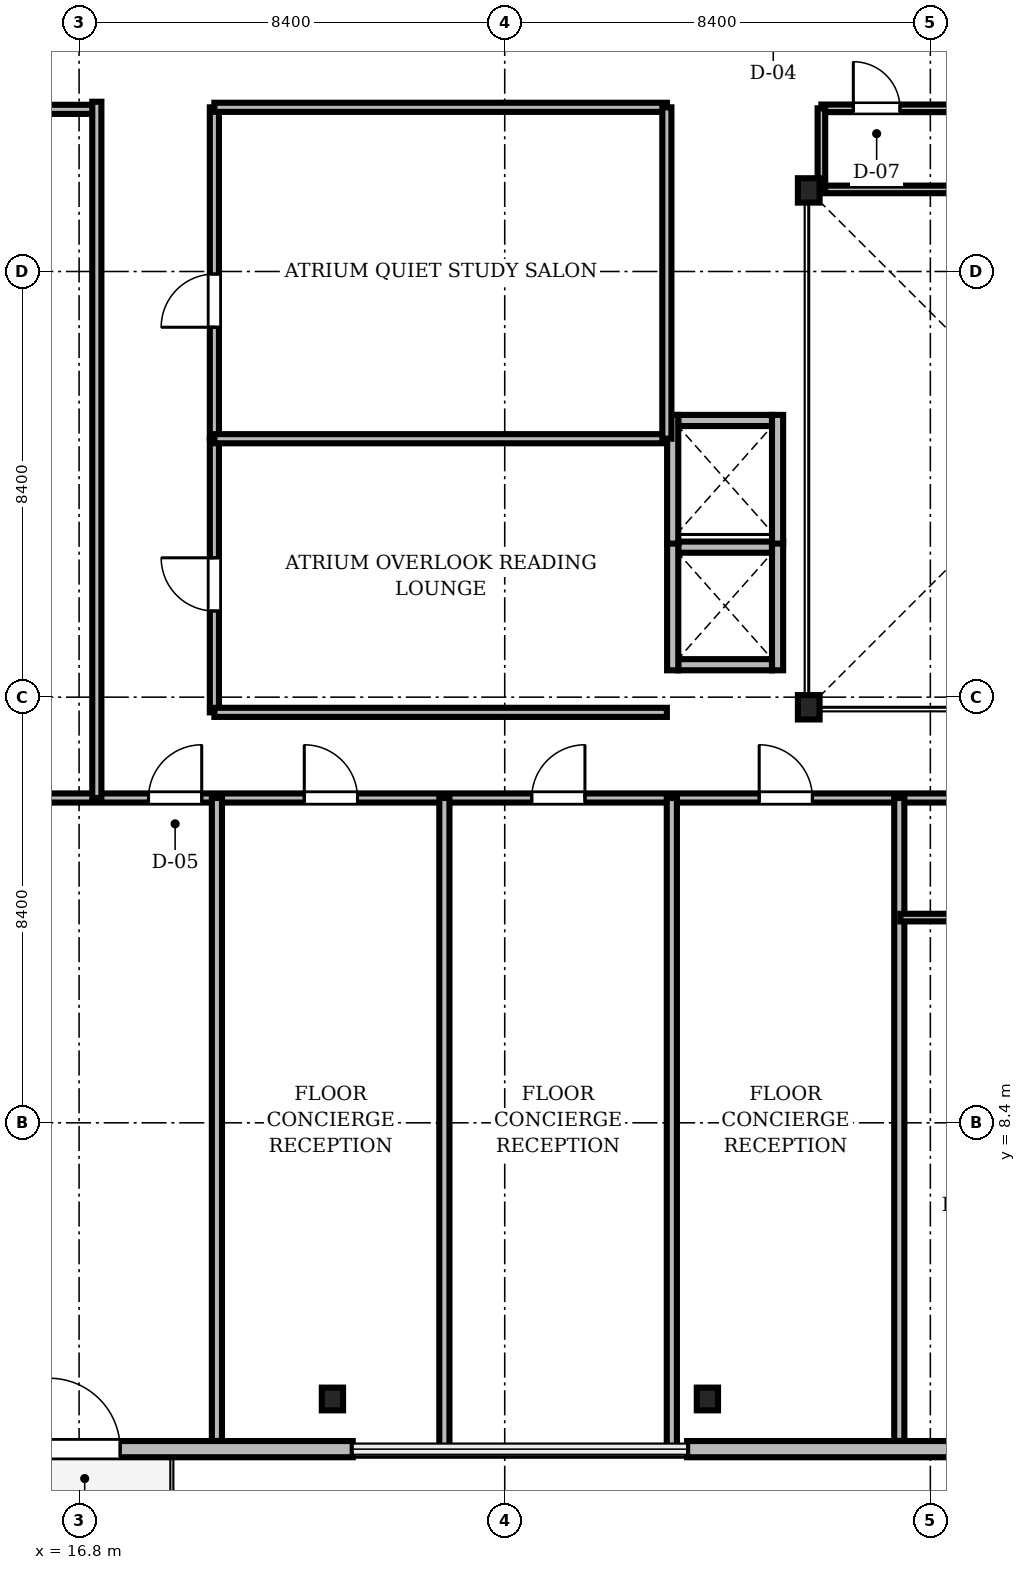
"""IFC4 building model, lengths in metres.
Left out: names, types, materials, properties, quantities, classifications, styles, units other than length and angle.
Written with IfcOpenShell. Run it as: python <this file> out.ifc"""

import sys

from ifc_helpers import new_model, si_unit, direction, frame, frame_2d, origin, origin_2d, place, context, subcontext, project, spatial, rectangle, i_section, extrude, source, transform, mapped, element, fill, save


model = new_model("IFC4")
c1 = context("Model", 3, precision=1e-05, world=origin(), true_north=direction((0.0, 1.0)))
c2 = subcontext(c1, "Body", "Model", "MODEL_VIEW")
j1 = project(units=[si_unit("LENGTHUNIT", "METRE"), si_unit("PLANEANGLEUNIT", "RADIAN")], contexts=[c1])
p1 = place(None, origin())
s1 = spatial("IfcSite", under=j1, at=p1, CompositionType="ELEMENT")
p2 = place(p1, origin())
s2 = spatial("IfcBuilding", under=s1, at=p2, CompositionType="ELEMENT")
p3 = place(p2, frame((0.0, 0.0, 86.0)))
s3 = spatial("IfcBuildingStorey", under=s2, at=p3, CompositionType="ELEMENT", Elevation=86.0)
m1 = source(origin(), c2, "Body", "SweptSolid", [
    extrude(i_section(OverallWidth=0.428, OverallDepth=0.481, WebThickness=0.04, FlangeThickness=0.063, FilletRadius=0.015, at=origin_2d()), origin(), (0.0, 0.0, 1.0), 3.41),
])
for number, where, z_axis, x_axis in (
    (1, (31.2, 16.6, 0.0), (0.0, 0.0, 1.0), (1.0, 0.0, 0.0)),
    (2, (31.2, 26.8, 0.0), (0.0, 0.0, 1.0), (1.0, 0.0, 0.0)),
):
    element("IfcColumn", number, at=place(p3, frame(where, z_axis=z_axis, x_axis=x_axis)), inside=s3, PredefinedType="COLUMN", context=c2, shape_type="MappedRepresentation", body=[
        mapped(m1, transform((0.0, 0.0, 0.0), scale=1.0)),
    ])
m2 = source(origin(), c2, "Body", "SweptSolid", [
    extrude(i_section(OverallWidth=0.419, OverallDepth=0.449, WebThickness=0.031, FlangeThickness=0.048, FilletRadius=0.015, at=origin_2d()), origin(), (0.0, 0.0, 1.0), 3.41),
])
for number, where, z_axis, x_axis in (
    (3, (21.8, 2.95, 0.0), (0.0, 0.0, 1.0), (1.0, 0.0, 0.0)),
    (4, (29.2, 2.95, 0.0), (0.0, 0.0, 1.0), (1.0, 0.0, 0.0)),
):
    element("IfcColumn", number, at=place(p3, frame(where, z_axis=z_axis, x_axis=x_axis)), inside=s3, PredefinedType="COLUMN", context=c2, shape_type="MappedRepresentation", body=[
        mapped(m2, transform((0.0, 0.0, 0.0), scale=1.0)),
    ])
m3 = source(origin(), c2, "Body", "SweptSolid", [
    extrude(rectangle(XDim=15.6, YDim=0.32, at=frame_2d((7.8, 0.0))), origin(), (0.0, 0.0, 1.0), 3.41),
])
p4 = place(p3, frame((6.6, 1.96, 0.0), z_axis=(0.0, 0.0, 1.0), x_axis=(1.0, 0.0, 0.0)))
e5 = element("IfcWall", 5, at=p4, inside=s3, PredefinedType="SOLIDWALL", context=c2, shape_type="MappedRepresentation", body=[
    mapped(m3, transform((0.0, 0.0, 0.0), scale=1.0)),
])
m4 = source(origin(), c2, "Body", "SweptSolid", [
    extrude(rectangle(XDim=1.4, YDim=2.3, at=frame_2d((0.7, 1.15))), frame((0.0, 0.17, 0.0), z_axis=(0.0, -1.0, 0.0), x_axis=(1.0, 0.0, 0.0)), (0.0, 0.0, 1.0), 0.34),
])
p5 = place(p4, frame((9.61, 0.0, 0.0)))
e6 = element("IfcOpeningElement", 6, at=p5, cuts=e5, PredefinedType="OPENING", context=c2, shape_type="MappedRepresentation", body=[
    mapped(m4, transform((0.0, 0.0, 0.0), scale=1.0)),
])
m5 = source(origin(), c2, "Body", "SweptSolid", [
    extrude(rectangle(XDim=2.8, YDim=2.4, at=frame_2d((1.4, 1.2))), frame((0.0, 0.17, 0.0), z_axis=(0.0, -1.0, 0.0), x_axis=(1.0, 0.0, 0.0)), (0.0, 0.0, 1.0), 0.34),
])
p6 = place(p4, frame((2.705, 0.0, 0.72)))
e7 = element("IfcOpeningElement", 7, at=p6, cuts=e5, PredefinedType="OPENING", context=c2, shape_type="MappedRepresentation", body=[
    mapped(m5, transform((0.0, 0.0, 0.0), scale=1.0)),
])
p7 = place(p3, frame((28.8, 1.96, 0.0), z_axis=(0.0, 0.0, 1.0), x_axis=(1.0, 0.0, 0.0)))
e8 = element("IfcWall", 8, at=p7, inside=s3, PredefinedType="SOLIDWALL", context=c2, shape_type="MappedRepresentation", body=[
    mapped(m3, transform((0.0, 0.0, 0.0), scale=1.0)),
])
p8 = place(p7, frame((9.645, 0.0, 0.72)))
e9 = element("IfcOpeningElement", 9, at=p8, cuts=e8, PredefinedType="OPENING", context=c2, shape_type="MappedRepresentation", body=[
    mapped(m5, transform((0.0, 0.0, 0.0), scale=1.0)),
])
m6 = source(origin(), c2, "Body", "SweptSolid", [
    extrude(rectangle(XDim=1.8, YDim=2.4, at=frame_2d((0.9, 1.2))), frame((0.0, 0.17, 0.0), z_axis=(0.0, -1.0, 0.0), x_axis=(1.0, 0.0, 0.0)), (0.0, 0.0, 1.0), 0.34),
])
p9 = place(p7, frame((5.531, 0.0, 0.72)))
e10 = element("IfcOpeningElement", 10, at=p9, cuts=e8, PredefinedType="OPENING", context=c2, shape_type="MappedRepresentation", body=[
    mapped(m6, transform((0.0, 0.0, 0.0), scale=1.0)),
])
m7 = source(origin(), c2, "Body", "SweptSolid", [
    extrude(rectangle(XDim=1.85, YDim=0.22, at=frame_2d((0.925, 0.0))), origin(), (0.0, 0.0, 1.0), 3.41),
])
for number, where, z_axis, x_axis in (
    (11, (28.625, 17.44, 0.0), (0.0, 0.0, 1.0), (1.0, 0.0, 0.0)),
    (12, (28.625, 19.76, 0.0), (0.0, 0.0, 1.0), (1.0, 0.0, 0.0)),
):
    element("IfcWall", number, at=place(p3, frame(where, z_axis=z_axis, x_axis=x_axis)), inside=s3, PredefinedType="SOLIDWALL", context=c2, shape_type="MappedRepresentation", body=[
        mapped(m7, transform((0.0, 0.0, 0.0), scale=1.0)),
    ])
m8 = source(origin(), c2, "Body", "SweptSolid", [
    extrude(rectangle(XDim=2.54, YDim=0.22, at=frame_2d((1.27, 0.0))), origin(), (0.0, 0.0, 1.0), 3.41),
])
for number, where, z_axis, x_axis in (
    (13, (28.515, 17.33, 0.0), (0.0, 0.0, 1.0), (0.0, 1.0, 0.0)),
    (14, (30.585, 17.33, 0.0), (0.0, 0.0, 1.0), (0.0, 1.0, 0.0)),
):
    element("IfcWall", number, at=place(p3, frame(where, z_axis=z_axis, x_axis=x_axis)), inside=s3, PredefinedType="SOLIDWALL", context=c2, shape_type="MappedRepresentation", body=[
        mapped(m8, transform((0.0, 0.0, 0.0), scale=1.0)),
    ])
p10 = place(p3, frame((28.625, 22.26, 0.0), z_axis=(0.0, 0.0, 1.0), x_axis=(1.0, 0.0, 0.0)))
e15 = element("IfcWall", 15, at=p10, inside=s3, PredefinedType="SOLIDWALL", context=c2, shape_type="MappedRepresentation", body=[
    mapped(m7, transform((0.0, 0.0, 0.0), scale=1.0)),
])
for number, where, z_axis, x_axis in (
    (16, (28.515, 19.83, 0.0), (0.0, 0.0, 1.0), (0.0, 1.0, 0.0)),
    (17, (30.585, 19.83, 0.0), (0.0, 0.0, 1.0), (0.0, 1.0, 0.0)),
):
    element("IfcWall", number, at=place(p3, frame(where, z_axis=z_axis, x_axis=x_axis)), inside=s3, PredefinedType="SOLIDWALL", context=c2, shape_type="MappedRepresentation", body=[
        mapped(m8, transform((0.0, 0.0, 0.0), scale=1.0)),
    ])
m9 = source(origin(), c2, "Body", "SweptSolid", [
    extrude(rectangle(XDim=46.156, YDim=0.18, at=frame_2d((23.078, 0.0))), origin(), (0.0, 0.0, 1.0), 2.652),
])
p11 = place(p3, frame((2.422, 14.81, 0.0), z_axis=(0.0, 0.0, 1.0), x_axis=(1.0, 0.0, 0.0)))
e18 = element("IfcWall", 18, at=p11, inside=s3, PredefinedType="PARTITIONING", context=c2, shape_type="MappedRepresentation", body=[
    mapped(m9, transform((0.0, 0.0, 0.0), scale=1.0)),
])
m10 = source(origin(), c2, "Body", "SweptSolid", [
    extrude(rectangle(XDim=1.05, YDim=2.2, at=frame_2d((0.525, 1.1))), frame((0.0, 0.1, 0.0), z_axis=(0.0, -1.0, 0.0), x_axis=(1.0, 0.0, 0.0)), (0.0, 0.0, 1.0), 0.2),
])
p12 = place(p11, frame((15.748, 0.0, 0.0)))
e19 = element("IfcOpeningElement", 19, at=p12, cuts=e18, PredefinedType="OPENING", context=c2, shape_type="MappedRepresentation", body=[
    mapped(m10, transform((0.0, 0.0, 0.0), scale=1.0)),
])
p13 = place(p11, frame((18.823, 0.0, 0.0)))
e20 = element("IfcOpeningElement", 20, at=p13, cuts=e18, PredefinedType="OPENING", context=c2, shape_type="MappedRepresentation", body=[
    mapped(m10, transform((0.0, 0.0, 0.0), scale=1.0)),
])
p14 = place(p11, frame((23.311, 0.0, 0.0)))
e21 = element("IfcOpeningElement", 21, at=p14, cuts=e18, PredefinedType="OPENING", context=c2, shape_type="MappedRepresentation", body=[
    mapped(m10, transform((0.0, 0.0, 0.0), scale=1.0)),
])
p15 = place(p11, frame((27.8, 0.0, 0.0)))
e22 = element("IfcOpeningElement", 22, at=p15, cuts=e18, PredefinedType="OPENING", context=c2, shape_type="MappedRepresentation", body=[
    mapped(m10, transform((0.0, 0.0, 0.0), scale=1.0)),
])
m11 = source(origin(), c2, "Body", "SweptSolid", [
    extrude(rectangle(XDim=0.95, YDim=2.15, at=frame_2d((0.475, 1.075))), frame((0.0, 0.1, 0.0), z_axis=(0.0, -1.0, 0.0), x_axis=(1.0, 0.0, 0.0)), (0.0, 0.0, 1.0), 0.2),
])
p16 = place(p11, frame((33.514, 0.0, 0.0)))
e23 = element("IfcOpeningElement", 23, at=p16, cuts=e18, PredefinedType="OPENING", context=c2, shape_type="MappedRepresentation", body=[
    mapped(m11, transform((0.0, 0.0, 0.0), scale=1.0)),
])
p17 = place(p11, frame((36.778, 0.0, 0.0)))
e24 = element("IfcOpeningElement", 24, at=p17, cuts=e18, PredefinedType="OPENING", context=c2, shape_type="MappedRepresentation", body=[
    mapped(m10, transform((0.0, 0.0, 0.0), scale=1.0)),
])
p18 = place(p11, frame((42.315, 0.0, 0.0)))
e25 = element("IfcOpeningElement", 25, at=p18, cuts=e18, PredefinedType="OPENING", context=c2, shape_type="MappedRepresentation", body=[
    mapped(m10, transform((0.0, 0.0, 0.0), scale=1.0)),
])
m12 = source(origin(), c2, "Body", "SweptSolid", [
    extrude(rectangle(XDim=6.54, YDim=0.18, at=frame_2d((3.27, 0.0))), origin(), (0.0, 0.0, 1.0), 2.802),
])
p19 = place(p3, frame((19.47, 21.9, 0.0), z_axis=(0.0, 0.0, 1.0), x_axis=(0.0, 1.0, 0.0)))
e26 = element("IfcWall", 26, at=p19, inside=s3, PredefinedType="PARTITIONING", context=c2, shape_type="MappedRepresentation", body=[
    mapped(m12, transform((0.0, 0.0, 0.0), scale=1.0)),
])
p20 = place(p19, frame((2.2, 0.0, 0.0)))
e27 = element("IfcOpeningElement", 27, at=p20, cuts=e26, PredefinedType="OPENING", context=c2, shape_type="MappedRepresentation", body=[
    mapped(m10, transform((0.0, 0.0, 0.0), scale=1.0)),
])
m13 = source(origin(), c2, "Body", "SweptSolid", [
    extrude(rectangle(XDim=5.4, YDim=0.18, at=frame_2d((2.7, 0.0))), origin(), (0.0, 0.0, 1.0), 2.802),
])
p21 = place(p3, frame((19.47, 16.5, 0.0), z_axis=(0.0, 0.0, 1.0), x_axis=(0.0, 1.0, 0.0)))
e28 = element("IfcWall", 28, at=p21, inside=s3, PredefinedType="PARTITIONING", context=c2, shape_type="MappedRepresentation", body=[
    mapped(m13, transform((0.0, 0.0, 0.0), scale=1.0)),
])
p22 = place(p21, frame((2.0, 0.0, 0.0)))
e29 = element("IfcOpeningElement", 29, at=p22, cuts=e28, PredefinedType="OPENING", context=c2, shape_type="MappedRepresentation", body=[
    mapped(m10, transform((0.0, 0.0, 0.0), scale=1.0)),
])
m14 = source(origin(), c2, "Body", "SweptSolid", [
    extrude(rectangle(XDim=2.67, YDim=0.15, at=frame_2d((1.335, 0.0))), origin(), (0.0, 0.0, 1.0), 3.042),
])
p23 = place(p3, frame((31.45, 28.42, 0.0), z_axis=(0.0, 0.0, 1.0), x_axis=(1.0, 0.0, 0.0)))
e30 = element("IfcWall", 30, at=p23, inside=s3, PredefinedType="PARTITIONING", context=c2, shape_type="MappedRepresentation", body=[
    mapped(m14, transform((0.0, 0.0, 0.0), scale=1.0)),
])
m15 = source(origin(), c2, "Body", "SweptSolid", [
    extrude(rectangle(XDim=0.92, YDim=2.1, at=frame_2d((0.46, 1.05))), frame((0.0, 0.085, 0.0), z_axis=(0.0, -1.0, 0.0), x_axis=(1.0, 0.0, 0.0)), (0.0, 0.0, 1.0), 0.17),
])
p24 = place(p23, frame((0.63, 0.0, 0.0)))
e31 = element("IfcOpeningElement", 31, at=p24, cuts=e30, PredefinedType="OPENING", context=c2, shape_type="MappedRepresentation", body=[
    mapped(m15, transform((0.0, 0.0, 0.0), scale=1.0)),
])
m16 = source(origin(), c2, "Body", "SweptSolid", [
    extrude(rectangle(XDim=14.92, YDim=0.18, at=frame_2d((7.46, 0.0))), origin(), (0.0, 0.0, 1.0), 2.652),
])
p25 = place(p3, frame((2.23, 28.4, 0.0), z_axis=(0.0, 0.0, 1.0), x_axis=(1.0, 0.0, 0.0)))
e32 = element("IfcWall", 32, at=p25, inside=s3, PredefinedType="PARTITIONING", context=c2, shape_type="MappedRepresentation", body=[
    mapped(m16, transform((0.0, 0.0, 0.0), scale=1.0)),
])
m17 = source(origin(), c2, "Body", "SweptSolid", [
    extrude(rectangle(XDim=13.74, YDim=0.18, at=frame_2d((6.87, 0.0))), origin(), (0.0, 0.0, 1.0), 2.802),
])
p26 = place(p3, frame((17.15, 14.81, 0.0), z_axis=(0.0, 0.0, 1.0), x_axis=(0.0, 1.0, 0.0)))
e33 = element("IfcWall", 33, at=p26, inside=s3, PredefinedType="PARTITIONING", context=c2, shape_type="MappedRepresentation", body=[
    mapped(m17, transform((0.0, 0.0, 0.0), scale=1.0)),
])
m18 = source(origin(), c2, "Body", "SweptSolid", [
    extrude(rectangle(XDim=12.688, YDim=0.2, at=frame_2d((6.344, 0.0))), origin(), (0.0, 0.0, 1.0), 2.652),
])
p27 = place(p3, frame((19.52, 2.122, 0.0), z_axis=(0.0, 0.0, 1.0), x_axis=(0.0, 1.0, 0.0)))
e34 = element("IfcWall", 34, at=p27, inside=s3, PredefinedType="PARTITIONING", context=c2, shape_type="MappedRepresentation", body=[
    mapped(m18, transform((0.0, 0.0, 0.0), scale=1.0)),
])
m19 = source(origin(), c2, "Body", "SweptSolid", [
    extrude(rectangle(XDim=12.88, YDim=0.2, at=frame_2d((6.44, 0.0))), origin(), (0.0, 0.0, 1.0), 2.652),
])
for number, where, z_axis, x_axis in (
    (35, (24.009, 1.93, 0.0), (0.0, 0.0, 1.0), (0.0, 1.0, 0.0)),
    (36, (28.498, 1.93, 0.0), (0.0, 0.0, 1.0), (0.0, 1.0, 0.0)),
):
    element("IfcWall", number, at=place(p3, frame(where, z_axis=z_axis, x_axis=x_axis)), inside=s3, PredefinedType="PARTITIONING", context=c2, shape_type="MappedRepresentation", body=[
        mapped(m19, transform((0.0, 0.0, 0.0), scale=1.0)),
    ])
p28 = place(p3, frame((32.987, 2.122, 0.0), z_axis=(0.0, 0.0, 1.0), x_axis=(0.0, 1.0, 0.0)))
e37 = element("IfcWall", 37, at=p28, inside=s3, PredefinedType="PARTITIONING", context=c2, shape_type="MappedRepresentation", body=[
    mapped(m18, transform((0.0, 0.0, 0.0), scale=1.0)),
])
m20 = source(origin(), c2, "Body", "SweptSolid", [
    extrude(rectangle(XDim=8.93, YDim=0.18, at=frame_2d((4.465, 0.0))), origin(), (0.0, 0.0, 1.0), 2.802),
])
p29 = place(p3, frame((19.47, 16.5, 0.0), z_axis=(0.0, 0.0, 1.0), x_axis=(1.0, 0.0, 0.0)))
e38 = element("IfcWall", 38, at=p29, inside=s3, PredefinedType="PARTITIONING", context=c2, shape_type="MappedRepresentation", body=[
    mapped(m20, transform((0.0, 0.0, 0.0), scale=1.0)),
])
m21 = source(origin(), c2, "Body", "SweptSolid", [
    extrude(rectangle(XDim=8.93, YDim=0.18, at=frame_2d((4.465, 0.0))), origin(), (0.0, 0.0, 1.0), 3.41),
])
for number, where, z_axis, x_axis in (
    (39, (19.47, 21.9, 0.0), (0.0, 0.0, 1.0), (1.0, 0.0, 0.0)),
    (40, (19.47, 28.44, 0.0), (0.0, 0.0, 1.0), (1.0, 0.0, 0.0)),
):
    element("IfcWall", number, at=place(p3, frame(where, z_axis=z_axis, x_axis=x_axis)), inside=s3, PredefinedType="PARTITIONING", context=c2, shape_type="MappedRepresentation", body=[
        mapped(m21, transform((0.0, 0.0, 0.0), scale=1.0)),
    ])
p30 = place(p3, frame((28.4, 21.9, 0.0), z_axis=(0.0, 0.0, 1.0), x_axis=(0.0, 1.0, 0.0)))
e41 = element("IfcWall", 41, at=p30, inside=s3, PredefinedType="PARTITIONING", context=c2, shape_type="MappedRepresentation", body=[
    mapped(m12, transform((0.0, 0.0, 0.0), scale=1.0)),
])
m22 = source(origin(), c2, "Body", "SweptSolid", [
    extrude(rectangle(XDim=2.67, YDim=0.15, at=frame_2d((1.335, 0.0))), origin(), (0.0, 0.0, 1.0), 2.952),
])
p31 = place(p3, frame((31.45, 26.82, 0.0), z_axis=(0.0, 0.0, 1.0), x_axis=(1.0, 0.0, 0.0)))
e42 = element("IfcWall", 42, at=p31, inside=s3, PredefinedType="PARTITIONING", context=c2, shape_type="MappedRepresentation", body=[
    mapped(m22, transform((0.0, 0.0, 0.0), scale=1.0)),
])
m23 = source(origin(), c2, "Body", "SweptSolid", [
    extrude(rectangle(XDim=2.29, YDim=0.15, at=frame_2d((1.145, 0.0))), origin(), (0.0, 0.0, 1.0), 2.802),
])
p32 = place(p3, frame((33.007, 12.45, 0.0), z_axis=(0.0, 0.0, 1.0), x_axis=(1.0, 0.0, 0.0)))
e43 = element("IfcWall", 43, at=p32, inside=s3, PredefinedType="PARTITIONING", context=c2, shape_type="MappedRepresentation", body=[
    mapped(m23, transform((0.0, 0.0, 0.0), scale=1.0)),
])
m24 = source(origin(), c2, "Body", "SweptSolid", [
    extrude(rectangle(XDim=1.6, YDim=0.15, at=frame_2d((0.8, 0.0))), origin(), (0.0, 0.0, 1.0), 2.952),
])
p33 = place(p3, frame((31.45, 26.82, 0.0), z_axis=(0.0, 0.0, 1.0), x_axis=(0.0, 1.0, 0.0)))
e44 = element("IfcWall", 44, at=p33, inside=s3, PredefinedType="PARTITIONING", context=c2, shape_type="MappedRepresentation", body=[
    mapped(m24, transform((0.0, 0.0, 0.0), scale=1.0)),
])
m25 = source(origin(), c2, "Body", "SweptSolid", [
    extrude(rectangle(XDim=1.4, YDim=2.3, at=frame_2d((0.7, 1.15))), frame((0.0, 0.025, 0.0), z_axis=(0.0, -1.0, 0.0), x_axis=(1.0, 0.0, 0.0)), (0.0, 0.0, 1.0), 0.05),
])
p34 = place(p5, frame((1.4, 0.0, 0.0), z_axis=(0.0, 0.0, 1.0), x_axis=(-1.0, 0.0, 0.0)))
e45 = element("IfcDoor", 45, at=p34, inside=s3, OperationType="DOUBLE_DOOR_SLIDING", PredefinedType="DOOR", context=c2, shape_type="MappedRepresentation", body=[
    mapped(m25, transform((0.0, 0.0, 0.0), scale=1.0)),
])
fill(e6, e45)
m26 = source(origin(), c2, "Body", "SweptSolid", [
    extrude(rectangle(XDim=1.05, YDim=2.2, at=frame_2d((0.525, 1.1))), frame((0.0, 0.025, 0.0), z_axis=(0.0, -1.0, 0.0), x_axis=(1.0, 0.0, 0.0)), (0.0, 0.0, 1.0), 0.05),
])
p35 = place(p12, origin())
e46 = element("IfcDoor", 46, at=p35, inside=s3, OperationType="SINGLE_SWING_RIGHT", PredefinedType="DOOR", context=c2, shape_type="MappedRepresentation", body=[
    mapped(m26, transform((0.0, 0.0, 0.0), scale=1.0)),
])
fill(e19, e46)
p36 = place(p13, origin())
e47 = element("IfcDoor", 47, at=p36, inside=s3, OperationType="SINGLE_SWING_LEFT", PredefinedType="DOOR", context=c2, shape_type="MappedRepresentation", body=[
    mapped(m26, transform((0.0, 0.0, 0.0), scale=1.0)),
])
fill(e20, e47)
p37 = place(p14, origin())
e48 = element("IfcDoor", 48, at=p37, inside=s3, OperationType="SINGLE_SWING_RIGHT", PredefinedType="DOOR", context=c2, shape_type="MappedRepresentation", body=[
    mapped(m26, transform((0.0, 0.0, 0.0), scale=1.0)),
])
fill(e21, e48)
p38 = place(p15, origin())
e49 = element("IfcDoor", 49, at=p38, inside=s3, OperationType="SINGLE_SWING_LEFT", PredefinedType="DOOR", context=c2, shape_type="MappedRepresentation", body=[
    mapped(m26, transform((0.0, 0.0, 0.0), scale=1.0)),
])
fill(e22, e49)
p39 = place(p20, origin())
e50 = element("IfcDoor", 50, at=p39, inside=s3, OperationType="SINGLE_SWING_LEFT", PredefinedType="DOOR", context=c2, shape_type="MappedRepresentation", body=[
    mapped(m26, transform((0.0, 0.0, 0.0), scale=1.0)),
])
fill(e27, e50)
p40 = place(p22, origin())
e51 = element("IfcDoor", 51, at=p40, inside=s3, OperationType="SINGLE_SWING_RIGHT", PredefinedType="DOOR", context=c2, shape_type="MappedRepresentation", body=[
    mapped(m26, transform((0.0, 0.0, 0.0), scale=1.0)),
])
fill(e29, e51)
m27 = source(origin(), c2, "Body", "SweptSolid", [
    extrude(rectangle(XDim=0.92, YDim=2.1, at=frame_2d((0.46, 1.05))), frame((0.0, 0.025, 0.0), z_axis=(0.0, -1.0, 0.0), x_axis=(1.0, 0.0, 0.0)), (0.0, 0.0, 1.0), 0.05),
])
p41 = place(p24, origin())
e52 = element("IfcDoor", 52, at=p41, inside=s3, OperationType="SINGLE_SWING_LEFT", PredefinedType="DOOR", context=c2, shape_type="MappedRepresentation", body=[
    mapped(m27, transform((0.0, 0.0, 0.0), scale=1.0)),
])
fill(e31, e52)
save(model, sys.argv[1])
